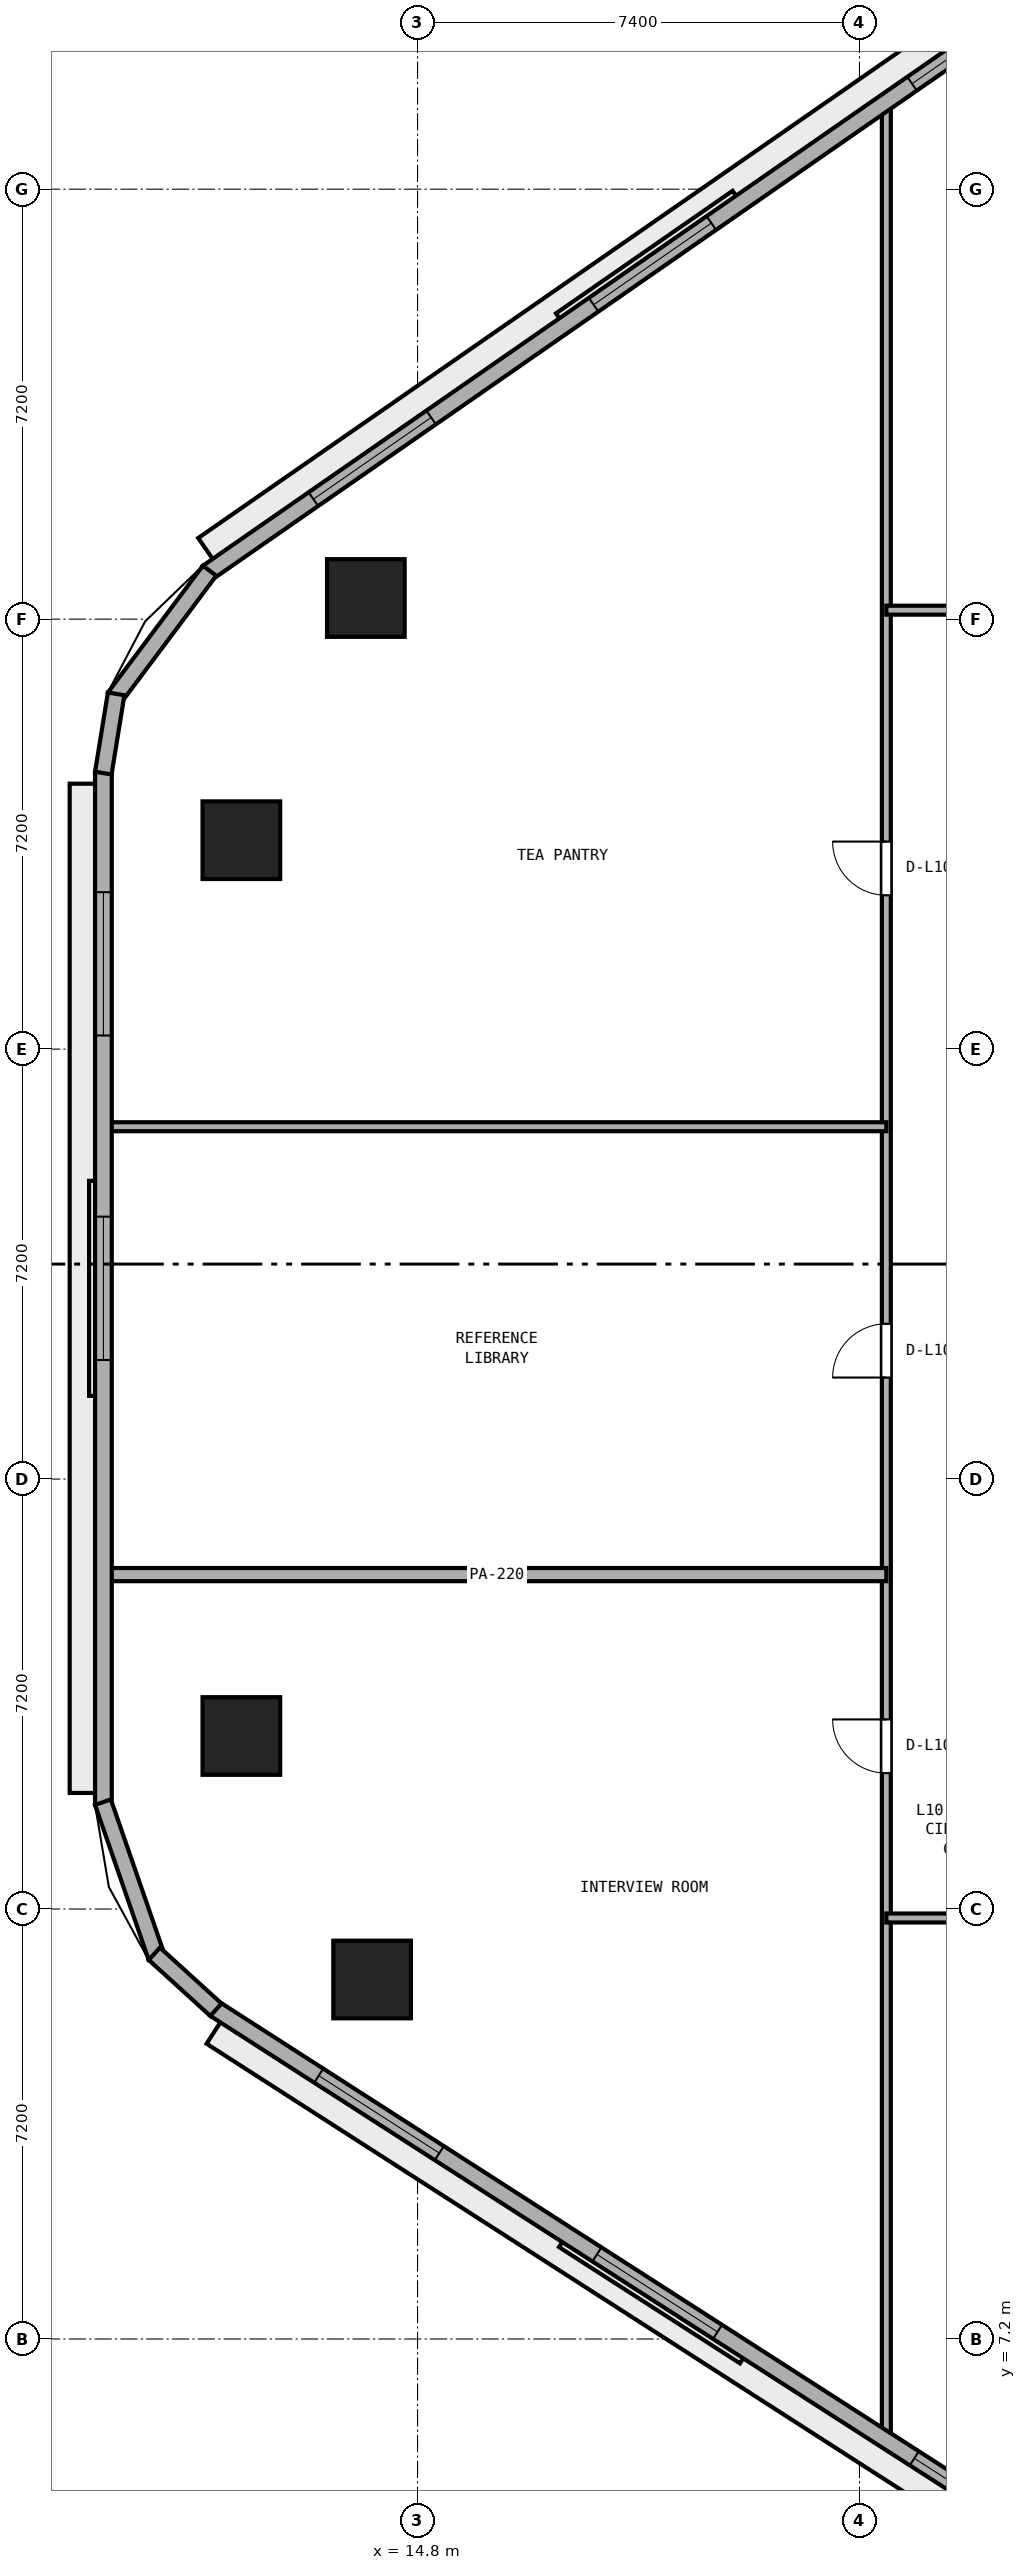
"""IFC4 building model, lengths in metres.
Left out: names, types, materials, properties, quantities, classifications, styles, units other than length and angle.
Written with IfcOpenShell. Run it as: python <this file> out.ifc"""

import sys

from ifc_helpers import new_model, si_unit, direction, frame, frame_2d, origin, origin_2d, place, context, subcontext, project, spatial, rectangle, extrude, element, fill, save


model = new_model("IFC4")
c1 = context("Model", 3, precision=1e-05, world=origin(), true_north=direction((0.0, 1.0)))
c2 = subcontext(c1, "Body", "Model", "MODEL_VIEW")
j1 = project(units=[si_unit("LENGTHUNIT", "METRE"), si_unit("PLANEANGLEUNIT", "RADIAN")], contexts=[c1])
p1 = place(None, origin())
s1 = spatial("IfcSite", under=j1, at=p1, CompositionType="ELEMENT")
p2 = place(p1, origin())
s2 = spatial("IfcBuilding", under=s1, at=p2, CompositionType="ELEMENT")
p3 = place(p2, frame((0.0, 0.0, 44.0)))
s3 = spatial("IfcBuildingStorey", under=s2, at=p3, CompositionType="ELEMENT", Elevation=44.0)
for number, where, z_axis, x_axis in (
    (1, (13.934, 36.354, 0.0), (0.0, 0.0, 1.0), (1.0, 0.0, 0.0)),
    (2, (11.85, 32.298, 0.0), (0.0, 0.0, 1.0), (1.0, 0.0, 0.0)),
    (3, (11.85, 17.298, 0.0), (0.0, 0.0, 1.0), (1.0, 0.0, 0.0)),
    (4, (14.039, 13.22, 0.0), (0.0, 0.0, 1.0), (1.0, 0.0, 0.0)),
):
    element("IfcColumn", number, at=place(p3, frame(where, z_axis=z_axis, x_axis=x_axis)), inside=s3, PredefinedType="COLUMN", context=c2, shape_type="SweptSolid", body=[
        extrude(rectangle(XDim=1.3, YDim=1.3, at=origin_2d()), origin(), (0.0, 0.0, 1.0), 3.8),
    ])
p4 = place(p3, frame((22.65, 5.476, 0.0), z_axis=(0.0, 0.0, 1.0), x_axis=(0.0, 1.0, 0.0)))
e5 = element("IfcWall", 5, at=p4, inside=s3, PredefinedType="PARTITIONING", context=c2, shape_type="SweptSolid", body=[
    extrude(rectangle(XDim=39.221, YDim=0.15, at=frame_2d((19.61, 0.0))), origin(), (0.0, 0.0, 1.0), 3.525),
])
p5 = place(p4, frame((11.199, 0.0, 0.0)))
e6 = element("IfcOpeningElement", 6, at=p5, cuts=e5, PredefinedType="OPENING", context=c2, shape_type="SweptSolid", body=[
    extrude(rectangle(XDim=0.9, YDim=2.1, at=frame_2d((0.45, 1.05))), frame((0.0, 0.085, 0.0), z_axis=(0.0, -1.0, 0.0), x_axis=(1.0, 0.0, 0.0)), (0.0, 0.0, 1.0), 0.17),
])
p6 = place(p4, frame((17.824, 0.0, 0.0)))
e7 = element("IfcOpeningElement", 7, at=p6, cuts=e5, PredefinedType="OPENING", context=c2, shape_type="SweptSolid", body=[
    extrude(rectangle(XDim=0.9, YDim=2.1, at=frame_2d((0.45, 1.05))), frame((0.0, 0.085, 0.0), z_axis=(0.0, -1.0, 0.0), x_axis=(1.0, 0.0, 0.0)), (0.0, 0.0, 1.0), 0.17),
])
p7 = place(p4, frame((25.899, 0.0, 0.0)))
e8 = element("IfcOpeningElement", 8, at=p7, cuts=e5, PredefinedType="OPENING", context=c2, shape_type="SweptSolid", body=[
    extrude(rectangle(XDim=0.9, YDim=2.1, at=frame_2d((0.45, 1.05))), frame((0.0, 0.085, 0.0), z_axis=(0.0, -1.0, 0.0), x_axis=(1.0, 0.0, 0.0)), (0.0, 0.0, 1.0), 0.17),
])
p8 = place(p3, frame((22.65, 14.25, 0.0), z_axis=(0.0, 0.0, 1.0), x_axis=(1.0, 0.0, 0.0)))
e9 = element("IfcWall", 9, at=p8, inside=s3, PredefinedType="PARTITIONING", context=c2, shape_type="SweptSolid", body=[
    extrude(rectangle(XDim=28.7, YDim=0.15, at=frame_2d((14.35, 0.0))), origin(), (0.0, 0.0, 1.0), 3.525),
])
p9 = place(p8, frame((4.845, 0.0, 0.0)))
e10 = element("IfcOpeningElement", 10, at=p9, cuts=e9, PredefinedType="OPENING", context=c2, shape_type="SweptSolid", body=[
    extrude(rectangle(XDim=0.9, YDim=2.1, at=frame_2d((0.45, 1.05))), frame((0.0, 0.085, 0.0), z_axis=(0.0, -1.0, 0.0), x_axis=(1.0, 0.0, 0.0)), (0.0, 0.0, 1.0), 0.17),
])
p10 = place(p8, frame((15.65, 0.0, 0.0)))
e11 = element("IfcOpeningElement", 11, at=p10, cuts=e9, PredefinedType="OPENING", context=c2, shape_type="SweptSolid", body=[
    extrude(rectangle(XDim=0.9, YDim=2.1, at=frame_2d((0.45, 1.05))), frame((0.0, 0.085, 0.0), z_axis=(0.0, -1.0, 0.0), x_axis=(1.0, 0.0, 0.0)), (0.0, 0.0, 1.0), 0.17),
])
p11 = place(p8, frame((24.705, 0.0, 0.0)))
e12 = element("IfcOpeningElement", 12, at=p11, cuts=e9, PredefinedType="OPENING", context=c2, shape_type="SweptSolid", body=[
    extrude(rectangle(XDim=0.9, YDim=2.1, at=frame_2d((0.45, 1.05))), frame((0.0, 0.085, 0.0), z_axis=(0.0, -1.0, 0.0), x_axis=(1.0, 0.0, 0.0)), (0.0, 0.0, 1.0), 0.17),
])
p12 = place(p3, frame((9.605, 20.0, 0.0), z_axis=(0.0, 0.0, 1.0), x_axis=(1.0, 0.0, 0.0)))
e13 = element("IfcWall", 13, at=p12, inside=s3, PredefinedType="PARTITIONING", context=c2, shape_type="SweptSolid", body=[
    extrude(rectangle(XDim=13.045, YDim=0.22, at=frame_2d((6.522, 0.0))), origin(), (0.0, 0.0, 1.0), 3.525),
])
p13 = place(p3, frame((9.605, 27.5, 0.0), z_axis=(0.0, 0.0, 1.0), x_axis=(1.0, 0.0, 0.0)))
e14 = element("IfcWall", 14, at=p13, inside=s3, PredefinedType="PARTITIONING", context=c2, shape_type="SweptSolid", body=[
    extrude(rectangle(XDim=13.045, YDim=0.15, at=frame_2d((6.522, 0.0))), origin(), (0.0, 0.0, 1.0), 3.525),
])
p14 = place(p3, frame((22.65, 36.15, 0.0), z_axis=(0.0, 0.0, 1.0), x_axis=(1.0, 0.0, 0.0)))
e15 = element("IfcWall", 15, at=p14, inside=s3, PredefinedType="PARTITIONING", context=c2, shape_type="SweptSolid", body=[
    extrude(rectangle(XDim=28.7, YDim=0.15, at=frame_2d((14.35, 0.0))), origin(), (0.0, 0.0, 1.0), 3.525),
])
p15 = place(p14, frame((6.095, 0.0, 0.0)))
e16 = element("IfcOpeningElement", 16, at=p15, cuts=e15, PredefinedType="OPENING", context=c2, shape_type="SweptSolid", body=[
    extrude(rectangle(XDim=0.9, YDim=2.1, at=frame_2d((0.45, 1.05))), frame((0.0, 0.085, 0.0), z_axis=(0.0, -1.0, 0.0), x_axis=(1.0, 0.0, 0.0)), (0.0, 0.0, 1.0), 0.17),
])
p16 = place(p14, frame((20.155, 0.0, 0.0)))
e17 = element("IfcOpeningElement", 17, at=p16, cuts=e15, PredefinedType="OPENING", context=c2, shape_type="SweptSolid", body=[
    extrude(rectangle(XDim=1.0, YDim=2.12, at=frame_2d((0.5, 1.06))), frame((0.0, 0.085, 0.0), z_axis=(0.0, -1.0, 0.0), x_axis=(1.0, 0.0, 0.0)), (0.0, 0.0, 1.0), 0.17),
])
p17 = place(p3, frame((26.182, 47.118, 0.0), z_axis=(0.0, 0.0, 1.0), x_axis=(-0.821547956627, -0.570139417127, 0.0)))
e18 = element("IfcWall", 18, at=p17, inside=s3, PredefinedType="STANDARD", context=c2, shape_type="SweptSolid", body=[
    extrude(rectangle(XDim=18.132, YDim=0.28, at=frame_2d((9.066, 0.0))), origin(), (0.0, 0.0, 1.0), 3.525),
])
p18 = place(p17, frame((1.375, 0.0, 0.9)))
e19 = element("IfcOpeningElement", 19, at=p18, cuts=e18, PredefinedType="OPENING", context=c2, shape_type="SweptSolid", body=[
    extrude(rectangle(XDim=2.4, YDim=1.75, at=frame_2d((1.2, 0.875))), frame((0.0, 0.15, 0.0), z_axis=(0.0, -1.0, 0.0), x_axis=(1.0, 0.0, 0.0)), (0.0, 0.0, 1.0), 0.3),
])
p19 = place(p17, frame((7.866, 0.0, 0.9)))
e20 = element("IfcOpeningElement", 20, at=p19, cuts=e18, PredefinedType="OPENING", context=c2, shape_type="SweptSolid", body=[
    extrude(rectangle(XDim=2.4, YDim=1.75, at=frame_2d((1.2, 0.875))), frame((0.0, 0.15, 0.0), z_axis=(0.0, -1.0, 0.0), x_axis=(1.0, 0.0, 0.0)), (0.0, 0.0, 1.0), 0.3),
])
p20 = place(p17, frame((13.577, 0.0, 0.9)))
e21 = element("IfcOpeningElement", 21, at=p20, cuts=e18, PredefinedType="OPENING", context=c2, shape_type="SweptSolid", body=[
    extrude(rectangle(XDim=2.4, YDim=1.75, at=frame_2d((1.2, 0.875))), frame((0.0, 0.15, 0.0), z_axis=(0.0, -1.0, 0.0), x_axis=(1.0, 0.0, 0.0)), (0.0, 0.0, 1.0), 0.3),
])
p21 = place(p3, frame((9.54, 33.444, 0.0), z_axis=(0.0, 0.0, 1.0), x_axis=(0.0, -1.0, 0.0)))
e22 = element("IfcWall", 22, at=p21, inside=s3, PredefinedType="STANDARD", context=c2, shape_type="SweptSolid", body=[
    extrude(rectangle(XDim=17.301, YDim=0.28, at=frame_2d((8.65, 0.0))), origin(), (0.0, 0.0, 1.0), 3.525),
])
p22 = place(p21, frame((2.017, 0.0, 0.9)))
e23 = element("IfcOpeningElement", 23, at=p22, cuts=e22, PredefinedType="OPENING", context=c2, shape_type="SweptSolid", body=[
    extrude(rectangle(XDim=2.4, YDim=1.75, at=frame_2d((1.2, 0.875))), frame((0.0, 0.15, 0.0), z_axis=(0.0, -1.0, 0.0), x_axis=(1.0, 0.0, 0.0)), (0.0, 0.0, 1.0), 0.3),
])
p23 = place(p21, frame((7.45, 0.0, 0.9)))
e24 = element("IfcOpeningElement", 24, at=p23, cuts=e22, PredefinedType="OPENING", context=c2, shape_type="SweptSolid", body=[
    extrude(rectangle(XDim=2.4, YDim=1.75, at=frame_2d((1.2, 0.875))), frame((0.0, 0.15, 0.0), z_axis=(0.0, -1.0, 0.0), x_axis=(1.0, 0.0, 0.0)), (0.0, 0.0, 1.0), 0.3),
])
p24 = place(p3, frame((11.405, 12.728, 0.0), z_axis=(0.0, 0.0, 1.0), x_axis=(0.841304564637, -0.540561402175, 0.0)))
e25 = element("IfcWall", 25, at=p24, inside=s3, PredefinedType="STANDARD", context=c2, shape_type="SweptSolid", body=[
    extrude(rectangle(XDim=17.612, YDim=0.28, at=frame_2d((8.806, 0.0))), origin(), (0.0, 0.0, 1.0), 3.525),
])
p25 = place(p24, frame((2.069, 0.0, 0.9)))
e26 = element("IfcOpeningElement", 26, at=p25, cuts=e25, PredefinedType="OPENING", context=c2, shape_type="SweptSolid", body=[
    extrude(rectangle(XDim=2.4, YDim=1.75, at=frame_2d((1.2, 0.875))), frame((0.0, 0.15, 0.0), z_axis=(0.0, -1.0, 0.0), x_axis=(1.0, 0.0, 0.0)), (0.0, 0.0, 1.0), 0.3),
])
p26 = place(p24, frame((7.606, 0.0, 0.9)))
e27 = element("IfcOpeningElement", 27, at=p26, cuts=e25, PredefinedType="OPENING", context=c2, shape_type="SweptSolid", body=[
    extrude(rectangle(XDim=2.4, YDim=1.75, at=frame_2d((1.2, 0.875))), frame((0.0, 0.15, 0.0), z_axis=(0.0, -1.0, 0.0), x_axis=(1.0, 0.0, 0.0)), (0.0, 0.0, 1.0), 0.3),
])
p27 = place(p24, frame((13.923, 0.0, 0.9)))
e28 = element("IfcOpeningElement", 28, at=p27, cuts=e25, PredefinedType="OPENING", context=c2, shape_type="SweptSolid", body=[
    extrude(rectangle(XDim=2.4, YDim=1.75, at=frame_2d((1.2, 0.875))), frame((0.0, 0.15, 0.0), z_axis=(0.0, -1.0, 0.0), x_axis=(1.0, 0.0, 0.0)), (0.0, 0.0, 1.0), 0.3),
])
p28 = place(p3, frame((11.318, 36.811, 0.0), z_axis=(0.0, 0.0, 1.0), x_axis=(-0.599455152629, -0.800408345775, 0.0)))
e29 = element("IfcWall", 29, at=p28, inside=s3, PredefinedType="STANDARD", context=c2, shape_type="SweptSolid", body=[
    extrude(rectangle(XDim=2.653, YDim=0.28, at=frame_2d((1.327, 0.0))), origin(), (0.0, 0.0, 1.0), 3.525),
])
p29 = place(p3, frame((9.753, 34.749, 0.0), z_axis=(0.0, 0.0, 1.0), x_axis=(-0.160037671962, -0.987110907423, 0.0)))
e30 = element("IfcWall", 30, at=p29, inside=s3, PredefinedType="STANDARD", context=c2, shape_type="SweptSolid", body=[
    extrude(rectangle(XDim=1.344, YDim=0.28, at=frame_2d((0.672, 0.0))), origin(), (0.0, 0.0, 1.0), 3.525),
])
p30 = place(p3, frame((9.532, 16.189, 0.0), z_axis=(0.0, 0.0, 1.0), x_axis=(0.32708309668, -0.944995580871, 0.0)))
e31 = element("IfcWall", 31, at=p30, inside=s3, PredefinedType="STANDARD", context=c2, shape_type="SweptSolid", body=[
    extrude(rectangle(XDim=2.748, YDim=0.28, at=frame_2d((1.374, 0.0))), origin(), (0.0, 0.0, 1.0), 3.525),
])
p31 = place(p3, frame((10.393, 13.651, 0.0), z_axis=(0.0, 0.0, 1.0), x_axis=(0.74003521851, -0.672568119498, 0.0)))
e32 = element("IfcWall", 32, at=p31, inside=s3, PredefinedType="STANDARD", context=c2, shape_type="SweptSolid", body=[
    extrude(rectangle(XDim=1.393, YDim=0.28, at=frame_2d((0.697, 0.0))), origin(), (0.0, 0.0, 1.0), 3.525),
])
p32 = place(p5, origin())
e33 = element("IfcDoor", 33, at=p32, inside=s3, OperationType="SINGLE_SWING_RIGHT", PredefinedType="DOOR", context=c2, shape_type="SweptSolid", body=[
    extrude(rectangle(XDim=0.9, YDim=2.1, at=frame_2d((0.45, 1.05))), frame((0.0, 0.025, 0.0), z_axis=(0.0, -1.0, 0.0), x_axis=(1.0, 0.0, 0.0)), (0.0, 0.0, 1.0), 0.05),
])
fill(e6, e33)
p33 = place(p6, origin())
e34 = element("IfcDoor", 34, at=p33, inside=s3, OperationType="SINGLE_SWING_LEFT", PredefinedType="DOOR", context=c2, shape_type="SweptSolid", body=[
    extrude(rectangle(XDim=0.9, YDim=2.1, at=frame_2d((0.45, 1.05))), frame((0.0, 0.025, 0.0), z_axis=(0.0, -1.0, 0.0), x_axis=(1.0, 0.0, 0.0)), (0.0, 0.0, 1.0), 0.05),
])
fill(e7, e34)
p34 = place(p7, origin())
e35 = element("IfcDoor", 35, at=p34, inside=s3, OperationType="SINGLE_SWING_RIGHT", PredefinedType="DOOR", context=c2, shape_type="SweptSolid", body=[
    extrude(rectangle(XDim=0.9, YDim=2.1, at=frame_2d((0.45, 1.05))), frame((0.0, 0.025, 0.0), z_axis=(0.0, -1.0, 0.0), x_axis=(1.0, 0.0, 0.0)), (0.0, 0.0, 1.0), 0.05),
])
fill(e8, e35)
p35 = place(p18, origin())
e36 = element("IfcWindow", 36, at=p35, inside=s3, PartitioningType="SINGLE_PANEL", PredefinedType="WINDOW", context=c2, shape_type="SweptSolid", body=[
    extrude(rectangle(XDim=2.4, YDim=1.75, at=frame_2d((1.2, 0.875))), frame((0.0, 0.03, 0.0), z_axis=(0.0, -1.0, 0.0), x_axis=(1.0, 0.0, 0.0)), (0.0, 0.0, 1.0), 0.06),
])
fill(e19, e36)
p36 = place(p19, origin())
e37 = element("IfcWindow", 37, at=p36, inside=s3, PartitioningType="SINGLE_PANEL", PredefinedType="WINDOW", context=c2, shape_type="SweptSolid", body=[
    extrude(rectangle(XDim=2.4, YDim=1.75, at=frame_2d((1.2, 0.875))), frame((0.0, 0.03, 0.0), z_axis=(0.0, -1.0, 0.0), x_axis=(1.0, 0.0, 0.0)), (0.0, 0.0, 1.0), 0.06),
])
fill(e20, e37)
p37 = place(p20, origin())
e38 = element("IfcWindow", 38, at=p37, inside=s3, PartitioningType="SINGLE_PANEL", PredefinedType="WINDOW", context=c2, shape_type="SweptSolid", body=[
    extrude(rectangle(XDim=2.4, YDim=1.75, at=frame_2d((1.2, 0.875))), frame((0.0, 0.03, 0.0), z_axis=(0.0, -1.0, 0.0), x_axis=(1.0, 0.0, 0.0)), (0.0, 0.0, 1.0), 0.06),
])
fill(e21, e38)
p38 = place(p22, origin())
e39 = element("IfcWindow", 39, at=p38, inside=s3, PartitioningType="SINGLE_PANEL", PredefinedType="WINDOW", context=c2, shape_type="SweptSolid", body=[
    extrude(rectangle(XDim=2.4, YDim=1.75, at=frame_2d((1.2, 0.875))), frame((0.0, 0.03, 0.0), z_axis=(0.0, -1.0, 0.0), x_axis=(1.0, 0.0, 0.0)), (0.0, 0.0, 1.0), 0.06),
])
fill(e23, e39)
p39 = place(p23, origin())
e40 = element("IfcWindow", 40, at=p39, inside=s3, PartitioningType="SINGLE_PANEL", PredefinedType="WINDOW", context=c2, shape_type="SweptSolid", body=[
    extrude(rectangle(XDim=2.4, YDim=1.75, at=frame_2d((1.2, 0.875))), frame((0.0, 0.03, 0.0), z_axis=(0.0, -1.0, 0.0), x_axis=(1.0, 0.0, 0.0)), (0.0, 0.0, 1.0), 0.06),
])
fill(e24, e40)
p40 = place(p25, origin())
e41 = element("IfcWindow", 41, at=p40, inside=s3, PartitioningType="SINGLE_PANEL", PredefinedType="WINDOW", context=c2, shape_type="SweptSolid", body=[
    extrude(rectangle(XDim=2.4, YDim=1.75, at=frame_2d((1.2, 0.875))), frame((0.0, 0.03, 0.0), z_axis=(0.0, -1.0, 0.0), x_axis=(1.0, 0.0, 0.0)), (0.0, 0.0, 1.0), 0.06),
])
fill(e26, e41)
p41 = place(p26, origin())
e42 = element("IfcWindow", 42, at=p41, inside=s3, PartitioningType="SINGLE_PANEL", PredefinedType="WINDOW", context=c2, shape_type="SweptSolid", body=[
    extrude(rectangle(XDim=2.4, YDim=1.75, at=frame_2d((1.2, 0.875))), frame((0.0, 0.03, 0.0), z_axis=(0.0, -1.0, 0.0), x_axis=(1.0, 0.0, 0.0)), (0.0, 0.0, 1.0), 0.06),
])
fill(e27, e42)
p42 = place(p27, origin())
e43 = element("IfcWindow", 43, at=p42, inside=s3, PartitioningType="SINGLE_PANEL", PredefinedType="WINDOW", context=c2, shape_type="SweptSolid", body=[
    extrude(rectangle(XDim=2.4, YDim=1.75, at=frame_2d((1.2, 0.875))), frame((0.0, 0.03, 0.0), z_axis=(0.0, -1.0, 0.0), x_axis=(1.0, 0.0, 0.0)), (0.0, 0.0, 1.0), 0.06),
])
fill(e28, e43)
save(model, sys.argv[1])
